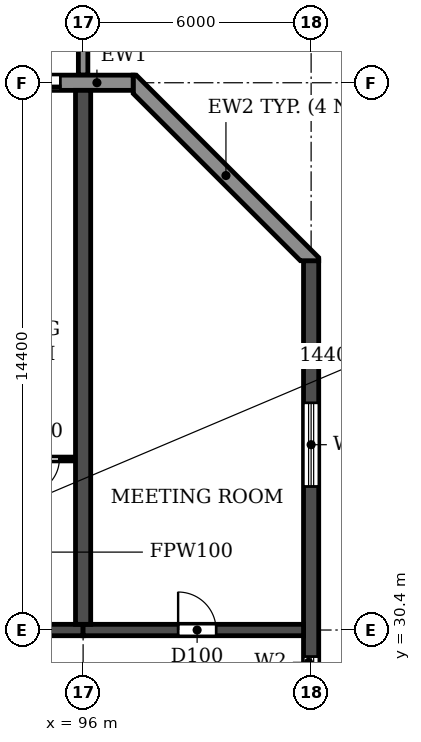
"""IFC4 building model, lengths in metres.
Left out: names, types, materials, properties, quantities, classifications, styles, units other than length and angle.
Written with IfcOpenShell. Run it as: python <this file> out.ifc"""

import sys

from ifc_helpers import new_model, si_unit, direction, frame, frame_2d, origin, place, context, subcontext, project, spatial, polyline, rectangle, outline, extrude, source, transform, mapped, element, fill, save


model = new_model("IFC4")
c1 = context("Model", 3, precision=1e-05, world=origin(), true_north=direction((0.0, 1.0)))
c2 = subcontext(c1, "Body", "Model", "MODEL_VIEW")
j1 = project(units=[si_unit("LENGTHUNIT", "METRE"), si_unit("PLANEANGLEUNIT", "RADIAN")], contexts=[c1])
p1 = place(None, origin())
s1 = spatial("IfcSite", under=j1, at=p1, CompositionType="ELEMENT")
p2 = place(p1, origin())
s2 = spatial("IfcBuilding", under=s1, at=p2, CompositionType="ELEMENT")
p3 = place(p2, frame((0.0, 0.0, 49.8)))
s3 = spatial("IfcBuildingStorey", under=s2, at=p3, CompositionType="ELEMENT", Elevation=49.8)
p4 = place(p3, frame((96.0, 30.55, 0.0), z_axis=(0.0, 0.0, 1.0), x_axis=(0.0, 1.0, 0.0)))
e1 = element("IfcWall", 1, at=p4, inside=s3, PredefinedType="SHEAR", context=c2, shape_type="SweptSolid", body=[
    extrude(rectangle(XDim=14.05, YDim=0.4, at=frame_2d((7.025, 0.0))), origin(), (0.0, 0.0, 1.0), 3.0),
])
p5 = place(p3, frame((102.0, 4.683, 0.0), z_axis=(0.0, 0.0, 1.0), x_axis=(0.0, 1.0, 0.0)))
e2 = element("IfcWall", 2, at=p5, inside=s3, PredefinedType="SHEAR", context=c2, shape_type="SweptSolid", body=[
    extrude(rectangle(XDim=35.434, YDim=0.4, at=frame_2d((17.717, 0.0))), origin(), (0.0, 0.0, 1.0), 3.0),
])
p6 = place(p5, frame((15.917, 0.0, 0.9)))
e3 = element("IfcOpeningElement", 3, at=p6, cuts=e2, PredefinedType="OPENING", context=c2, shape_type="SweptSolid", body=[
    extrude(rectangle(XDim=1.2, YDim=1.5, at=frame_2d((0.6, 0.75))), frame((0.0, 0.21, 0.0), z_axis=(0.0, -1.0, 0.0), x_axis=(1.0, 0.0, 0.0)), (0.0, 0.0, 1.0), 0.42),
])
p7 = place(p5, frame((23.817, 0.0, 0.9)))
e4 = element("IfcOpeningElement", 4, at=p7, cuts=e2, PredefinedType="OPENING", context=c2, shape_type="SweptSolid", body=[
    extrude(rectangle(XDim=1.2, YDim=1.5, at=frame_2d((0.6, 0.75))), frame((0.0, 0.21, 0.0), z_axis=(0.0, -1.0, 0.0), x_axis=(1.0, 0.0, 0.0)), (0.0, 0.0, 1.0), 0.42),
])
p8 = place(p5, frame((8.017, 0.0, 0.9)))
e5 = element("IfcOpeningElement", 5, at=p8, cuts=e2, PredefinedType="OPENING", context=c2, shape_type="SweptSolid", body=[
    extrude(rectangle(XDim=1.2, YDim=1.5, at=frame_2d((0.6, 0.75))), frame((0.0, 0.21, 0.0), z_axis=(0.0, -1.0, 0.0), x_axis=(1.0, 0.0, 0.0)), (0.0, 0.0, 1.0), 0.42),
])
p9 = place(p5, frame((29.493, 0.0, 0.6)))
e6 = element("IfcOpeningElement", 6, at=p9, cuts=e2, PredefinedType="OPENING", context=c2, shape_type="SweptSolid", body=[
    extrude(rectangle(XDim=2.2, YDim=1.8, at=frame_2d((1.1, 0.9))), frame((0.0, 0.21, 0.0), z_axis=(0.0, -1.0, 0.0), x_axis=(1.0, 0.0, 0.0)), (0.0, 0.0, 1.0), 0.42),
])
p10 = place(p5, frame((2.541, 0.0, 0.6)))
e7 = element("IfcOpeningElement", 7, at=p10, cuts=e2, PredefinedType="OPENING", context=c2, shape_type="SweptSolid", body=[
    extrude(rectangle(XDim=2.2, YDim=1.8, at=frame_2d((1.1, 0.9))), frame((0.0, 0.21, 0.0), z_axis=(0.0, -1.0, 0.0), x_axis=(1.0, 0.0, 0.0)), (0.0, 0.0, 1.0), 0.42),
])
p11 = place(p3, frame((90.0, 30.4, 0.0), z_axis=(0.0, 0.0, 1.0), x_axis=(1.0, 0.0, 0.0)))
e8 = element("IfcWall", 8, at=p11, inside=s3, PredefinedType="SHEAR", context=c2, shape_type="SweptSolid", body=[
    extrude(rectangle(XDim=6.0, YDim=0.3, at=frame_2d((3.0, 0.0))), origin(), (0.0, 0.0, 1.0), 2.4),
])
p12 = place(p11, frame((2.45, 0.0, 0.0)))
e9 = element("IfcOpeningElement", 9, at=p12, cuts=e8, PredefinedType="OPENING", context=c2, shape_type="SweptSolid", body=[
    extrude(rectangle(XDim=1.0, YDim=2.1, at=frame_2d((0.5, 1.05))), frame((0.0, 0.16, 0.0), z_axis=(0.0, -1.0, 0.0), x_axis=(1.0, 0.0, 0.0)), (0.0, 0.0, 1.0), 0.32),
])
p13 = place(p3, frame((96.0, 30.4, 0.0), z_axis=(0.0, 0.0, 1.0), x_axis=(1.0, 0.0, 0.0)))
e10 = element("IfcWall", 10, at=p13, inside=s3, PredefinedType="SHEAR", context=c2, shape_type="SweptSolid", body=[
    extrude(rectangle(XDim=5.8, YDim=0.3, at=frame_2d((2.9, 0.0))), origin(), (0.0, 0.0, 1.0), 2.4),
])
p14 = place(p13, frame((2.5, 0.0, 0.0)))
e11 = element("IfcOpeningElement", 11, at=p14, cuts=e10, PredefinedType="OPENING", context=c2, shape_type="SweptSolid", body=[
    extrude(rectangle(XDim=1.0, YDim=2.1, at=frame_2d((0.5, 1.05))), frame((0.0, 0.16, 0.0), z_axis=(0.0, -1.0, 0.0), x_axis=(1.0, 0.0, 0.0)), (0.0, 0.0, 1.0), 0.32),
])
p15 = place(p3, origin())
e12 = element("IfcWall", 12, at=p15, inside=s3, PredefinedType="STANDARD", context=c2, shape_type="SweptSolid", body=[
    extrude(outline(polyline([(102.2, 40.117), (102.2, 40.2), (97.4, 45.0), (97.317, 45.0), (97.317, 44.517), (101.717, 40.117), (102.2, 40.117)])), origin(), (0.0, 0.0, 1.0), 3.0),
])
p16 = place(p3, frame((97.317, 44.8, 0.0), z_axis=(0.0, 0.0, 1.0), x_axis=(-1.0, 0.0, 0.0)))
e13 = element("IfcWall", 13, at=p16, inside=s3, PredefinedType="STANDARD", context=c2, shape_type="SweptSolid", body=[
    extrude(rectangle(XDim=92.634, YDim=0.4, at=frame_2d((46.317, 0.0))), origin(), (0.0, 0.0, 1.0), 3.0),
])
p17 = place(p16, frame((88.917, 0.0, 0.0)))
e14 = element("IfcOpeningElement", 14, at=p17, cuts=e13, PredefinedType="OPENING", context=c2, shape_type="SweptSolid", body=[
    extrude(rectangle(XDim=1.8, YDim=2.4, at=frame_2d((0.9, 1.2))), frame((0.0, 0.21, 0.0), z_axis=(0.0, -1.0, 0.0), x_axis=(1.0, 0.0, 0.0)), (0.0, 0.0, 1.0), 0.42),
])
p18 = place(p16, frame((85.717, 0.0, 0.9)))
e15 = element("IfcOpeningElement", 15, at=p18, cuts=e13, PredefinedType="OPENING", context=c2, shape_type="SweptSolid", body=[
    extrude(rectangle(XDim=2.2, YDim=1.5, at=frame_2d((1.1, 0.75))), frame((0.0, 0.21, 0.0), z_axis=(0.0, -1.0, 0.0), x_axis=(1.0, 0.0, 0.0)), (0.0, 0.0, 1.0), 0.42),
])
p19 = place(p16, frame((82.717, 0.0, 0.9)))
e16 = element("IfcOpeningElement", 16, at=p19, cuts=e13, PredefinedType="OPENING", context=c2, shape_type="SweptSolid", body=[
    extrude(rectangle(XDim=2.2, YDim=1.5, at=frame_2d((1.1, 0.75))), frame((0.0, 0.21, 0.0), z_axis=(0.0, -1.0, 0.0), x_axis=(1.0, 0.0, 0.0)), (0.0, 0.0, 1.0), 0.42),
])
p20 = place(p16, frame((79.717, 0.0, 0.9)))
e17 = element("IfcOpeningElement", 17, at=p20, cuts=e13, PredefinedType="OPENING", context=c2, shape_type="SweptSolid", body=[
    extrude(rectangle(XDim=2.2, YDim=1.5, at=frame_2d((1.1, 0.75))), frame((0.0, 0.21, 0.0), z_axis=(0.0, -1.0, 0.0), x_axis=(1.0, 0.0, 0.0)), (0.0, 0.0, 1.0), 0.42),
])
p21 = place(p16, frame((76.717, 0.0, 0.9)))
e18 = element("IfcOpeningElement", 18, at=p21, cuts=e13, PredefinedType="OPENING", context=c2, shape_type="SweptSolid", body=[
    extrude(rectangle(XDim=2.2, YDim=1.5, at=frame_2d((1.1, 0.75))), frame((0.0, 0.21, 0.0), z_axis=(0.0, -1.0, 0.0), x_axis=(1.0, 0.0, 0.0)), (0.0, 0.0, 1.0), 0.42),
])
p22 = place(p16, frame((73.917, 0.0, 0.0)))
e19 = element("IfcOpeningElement", 19, at=p22, cuts=e13, PredefinedType="OPENING", context=c2, shape_type="SweptSolid", body=[
    extrude(rectangle(XDim=1.8, YDim=2.4, at=frame_2d((0.9, 1.2))), frame((0.0, 0.21, 0.0), z_axis=(0.0, -1.0, 0.0), x_axis=(1.0, 0.0, 0.0)), (0.0, 0.0, 1.0), 0.42),
])
p23 = place(p16, frame((70.717, 0.0, 0.9)))
e20 = element("IfcOpeningElement", 20, at=p23, cuts=e13, PredefinedType="OPENING", context=c2, shape_type="SweptSolid", body=[
    extrude(rectangle(XDim=2.2, YDim=1.5, at=frame_2d((1.1, 0.75))), frame((0.0, 0.21, 0.0), z_axis=(0.0, -1.0, 0.0), x_axis=(1.0, 0.0, 0.0)), (0.0, 0.0, 1.0), 0.42),
])
p24 = place(p16, frame((67.717, 0.0, 0.9)))
e21 = element("IfcOpeningElement", 21, at=p24, cuts=e13, PredefinedType="OPENING", context=c2, shape_type="SweptSolid", body=[
    extrude(rectangle(XDim=2.2, YDim=1.5, at=frame_2d((1.1, 0.75))), frame((0.0, 0.21, 0.0), z_axis=(0.0, -1.0, 0.0), x_axis=(1.0, 0.0, 0.0)), (0.0, 0.0, 1.0), 0.42),
])
p25 = place(p16, frame((64.717, 0.0, 0.9)))
e22 = element("IfcOpeningElement", 22, at=p25, cuts=e13, PredefinedType="OPENING", context=c2, shape_type="SweptSolid", body=[
    extrude(rectangle(XDim=2.2, YDim=1.5, at=frame_2d((1.1, 0.75))), frame((0.0, 0.21, 0.0), z_axis=(0.0, -1.0, 0.0), x_axis=(1.0, 0.0, 0.0)), (0.0, 0.0, 1.0), 0.42),
])
p26 = place(p16, frame((61.917, 0.0, 0.0)))
e23 = element("IfcOpeningElement", 23, at=p26, cuts=e13, PredefinedType="OPENING", context=c2, shape_type="SweptSolid", body=[
    extrude(rectangle(XDim=1.8, YDim=2.4, at=frame_2d((0.9, 1.2))), frame((0.0, 0.21, 0.0), z_axis=(0.0, -1.0, 0.0), x_axis=(1.0, 0.0, 0.0)), (0.0, 0.0, 1.0), 0.42),
])
p27 = place(p16, frame((58.717, 0.0, 0.9)))
e24 = element("IfcOpeningElement", 24, at=p27, cuts=e13, PredefinedType="OPENING", context=c2, shape_type="SweptSolid", body=[
    extrude(rectangle(XDim=2.2, YDim=1.5, at=frame_2d((1.1, 0.75))), frame((0.0, 0.21, 0.0), z_axis=(0.0, -1.0, 0.0), x_axis=(1.0, 0.0, 0.0)), (0.0, 0.0, 1.0), 0.42),
])
p28 = place(p16, frame((55.717, 0.0, 0.9)))
e25 = element("IfcOpeningElement", 25, at=p28, cuts=e13, PredefinedType="OPENING", context=c2, shape_type="SweptSolid", body=[
    extrude(rectangle(XDim=2.2, YDim=1.5, at=frame_2d((1.1, 0.75))), frame((0.0, 0.21, 0.0), z_axis=(0.0, -1.0, 0.0), x_axis=(1.0, 0.0, 0.0)), (0.0, 0.0, 1.0), 0.42),
])
p29 = place(p16, frame((52.717, 0.0, 0.9)))
e26 = element("IfcOpeningElement", 26, at=p29, cuts=e13, PredefinedType="OPENING", context=c2, shape_type="SweptSolid", body=[
    extrude(rectangle(XDim=2.2, YDim=1.5, at=frame_2d((1.1, 0.75))), frame((0.0, 0.21, 0.0), z_axis=(0.0, -1.0, 0.0), x_axis=(1.0, 0.0, 0.0)), (0.0, 0.0, 1.0), 0.42),
])
p30 = place(p16, frame((49.917, 0.0, 0.0)))
e27 = element("IfcOpeningElement", 27, at=p30, cuts=e13, PredefinedType="OPENING", context=c2, shape_type="SweptSolid", body=[
    extrude(rectangle(XDim=1.8, YDim=2.4, at=frame_2d((0.9, 1.2))), frame((0.0, 0.21, 0.0), z_axis=(0.0, -1.0, 0.0), x_axis=(1.0, 0.0, 0.0)), (0.0, 0.0, 1.0), 0.42),
])
p31 = place(p16, frame((46.717, 0.0, 0.9)))
e28 = element("IfcOpeningElement", 28, at=p31, cuts=e13, PredefinedType="OPENING", context=c2, shape_type="SweptSolid", body=[
    extrude(rectangle(XDim=2.2, YDim=1.5, at=frame_2d((1.1, 0.75))), frame((0.0, 0.21, 0.0), z_axis=(0.0, -1.0, 0.0), x_axis=(1.0, 0.0, 0.0)), (0.0, 0.0, 1.0), 0.42),
])
p32 = place(p16, frame((43.717, 0.0, 0.9)))
e29 = element("IfcOpeningElement", 29, at=p32, cuts=e13, PredefinedType="OPENING", context=c2, shape_type="SweptSolid", body=[
    extrude(rectangle(XDim=2.2, YDim=1.5, at=frame_2d((1.1, 0.75))), frame((0.0, 0.21, 0.0), z_axis=(0.0, -1.0, 0.0), x_axis=(1.0, 0.0, 0.0)), (0.0, 0.0, 1.0), 0.42),
])
p33 = place(p16, frame((40.717, 0.0, 0.9)))
e30 = element("IfcOpeningElement", 30, at=p33, cuts=e13, PredefinedType="OPENING", context=c2, shape_type="SweptSolid", body=[
    extrude(rectangle(XDim=2.2, YDim=1.5, at=frame_2d((1.1, 0.75))), frame((0.0, 0.21, 0.0), z_axis=(0.0, -1.0, 0.0), x_axis=(1.0, 0.0, 0.0)), (0.0, 0.0, 1.0), 0.42),
])
p34 = place(p16, frame((37.917, 0.0, 0.0)))
e31 = element("IfcOpeningElement", 31, at=p34, cuts=e13, PredefinedType="OPENING", context=c2, shape_type="SweptSolid", body=[
    extrude(rectangle(XDim=1.8, YDim=2.4, at=frame_2d((0.9, 1.2))), frame((0.0, 0.21, 0.0), z_axis=(0.0, -1.0, 0.0), x_axis=(1.0, 0.0, 0.0)), (0.0, 0.0, 1.0), 0.42),
])
p35 = place(p16, frame((34.717, 0.0, 0.9)))
e32 = element("IfcOpeningElement", 32, at=p35, cuts=e13, PredefinedType="OPENING", context=c2, shape_type="SweptSolid", body=[
    extrude(rectangle(XDim=2.2, YDim=1.5, at=frame_2d((1.1, 0.75))), frame((0.0, 0.21, 0.0), z_axis=(0.0, -1.0, 0.0), x_axis=(1.0, 0.0, 0.0)), (0.0, 0.0, 1.0), 0.42),
])
p36 = place(p16, frame((31.717, 0.0, 0.9)))
e33 = element("IfcOpeningElement", 33, at=p36, cuts=e13, PredefinedType="OPENING", context=c2, shape_type="SweptSolid", body=[
    extrude(rectangle(XDim=2.2, YDim=1.5, at=frame_2d((1.1, 0.75))), frame((0.0, 0.21, 0.0), z_axis=(0.0, -1.0, 0.0), x_axis=(1.0, 0.0, 0.0)), (0.0, 0.0, 1.0), 0.42),
])
p37 = place(p16, frame((28.717, 0.0, 0.9)))
e34 = element("IfcOpeningElement", 34, at=p37, cuts=e13, PredefinedType="OPENING", context=c2, shape_type="SweptSolid", body=[
    extrude(rectangle(XDim=2.2, YDim=1.5, at=frame_2d((1.1, 0.75))), frame((0.0, 0.21, 0.0), z_axis=(0.0, -1.0, 0.0), x_axis=(1.0, 0.0, 0.0)), (0.0, 0.0, 1.0), 0.42),
])
p38 = place(p16, frame((25.917, 0.0, 0.0)))
e35 = element("IfcOpeningElement", 35, at=p38, cuts=e13, PredefinedType="OPENING", context=c2, shape_type="SweptSolid", body=[
    extrude(rectangle(XDim=1.8, YDim=2.4, at=frame_2d((0.9, 1.2))), frame((0.0, 0.21, 0.0), z_axis=(0.0, -1.0, 0.0), x_axis=(1.0, 0.0, 0.0)), (0.0, 0.0, 1.0), 0.42),
])
p39 = place(p16, frame((22.917, 0.0, 0.0)))
e36 = element("IfcOpeningElement", 36, at=p39, cuts=e13, PredefinedType="OPENING", context=c2, shape_type="SweptSolid", body=[
    extrude(rectangle(XDim=1.8, YDim=2.4, at=frame_2d((0.9, 1.2))), frame((0.0, 0.21, 0.0), z_axis=(0.0, -1.0, 0.0), x_axis=(1.0, 0.0, 0.0)), (0.0, 0.0, 1.0), 0.42),
])
p40 = place(p16, frame((19.717, 0.0, 0.9)))
e37 = element("IfcOpeningElement", 37, at=p40, cuts=e13, PredefinedType="OPENING", context=c2, shape_type="SweptSolid", body=[
    extrude(rectangle(XDim=2.2, YDim=1.5, at=frame_2d((1.1, 0.75))), frame((0.0, 0.21, 0.0), z_axis=(0.0, -1.0, 0.0), x_axis=(1.0, 0.0, 0.0)), (0.0, 0.0, 1.0), 0.42),
])
p41 = place(p16, frame((16.717, 0.0, 0.9)))
e38 = element("IfcOpeningElement", 38, at=p41, cuts=e13, PredefinedType="OPENING", context=c2, shape_type="SweptSolid", body=[
    extrude(rectangle(XDim=2.2, YDim=1.5, at=frame_2d((1.1, 0.75))), frame((0.0, 0.21, 0.0), z_axis=(0.0, -1.0, 0.0), x_axis=(1.0, 0.0, 0.0)), (0.0, 0.0, 1.0), 0.42),
])
p42 = place(p16, frame((13.717, 0.0, 0.9)))
e39 = element("IfcOpeningElement", 39, at=p42, cuts=e13, PredefinedType="OPENING", context=c2, shape_type="SweptSolid", body=[
    extrude(rectangle(XDim=2.2, YDim=1.5, at=frame_2d((1.1, 0.75))), frame((0.0, 0.21, 0.0), z_axis=(0.0, -1.0, 0.0), x_axis=(1.0, 0.0, 0.0)), (0.0, 0.0, 1.0), 0.42),
])
p43 = place(p16, frame((10.717, 0.0, 0.9)))
e40 = element("IfcOpeningElement", 40, at=p43, cuts=e13, PredefinedType="OPENING", context=c2, shape_type="SweptSolid", body=[
    extrude(rectangle(XDim=2.2, YDim=1.5, at=frame_2d((1.1, 0.75))), frame((0.0, 0.21, 0.0), z_axis=(0.0, -1.0, 0.0), x_axis=(1.0, 0.0, 0.0)), (0.0, 0.0, 1.0), 0.42),
])
p44 = place(p16, frame((7.917, 0.0, 0.0)))
e41 = element("IfcOpeningElement", 41, at=p44, cuts=e13, PredefinedType="OPENING", context=c2, shape_type="SweptSolid", body=[
    extrude(rectangle(XDim=1.8, YDim=2.4, at=frame_2d((0.9, 1.2))), frame((0.0, 0.21, 0.0), z_axis=(0.0, -1.0, 0.0), x_axis=(1.0, 0.0, 0.0)), (0.0, 0.0, 1.0), 0.42),
])
p45 = place(p16, frame((4.717, 0.0, 0.9)))
e42 = element("IfcOpeningElement", 42, at=p45, cuts=e13, PredefinedType="OPENING", context=c2, shape_type="SweptSolid", body=[
    extrude(rectangle(XDim=2.2, YDim=1.5, at=frame_2d((1.1, 0.75))), frame((0.0, 0.21, 0.0), z_axis=(0.0, -1.0, 0.0), x_axis=(1.0, 0.0, 0.0)), (0.0, 0.0, 1.0), 0.42),
])
p46 = place(p16, frame((1.917, 0.0, 0.0)))
e43 = element("IfcOpeningElement", 43, at=p46, cuts=e13, PredefinedType="OPENING", context=c2, shape_type="SweptSolid", body=[
    extrude(rectangle(XDim=1.8, YDim=2.4, at=frame_2d((0.9, 1.2))), frame((0.0, 0.21, 0.0), z_axis=(0.0, -1.0, 0.0), x_axis=(1.0, 0.0, 0.0)), (0.0, 0.0, 1.0), 0.42),
])
m1 = source(origin(), c2, "Body", "SweptSolid", [
    extrude(outline(polyline([(0.0, 0.0), (0.25, 0.0), (0.25, 3.1), (0.0, 3.1), (0.0, 0.0)])), origin(), (0.0, 0.0, 1.0), 3.1),
])
p47 = place(p3, frame((95.875, 45.0, 0.0)))
e44 = element("IfcWall", 44, at=p47, inside=s3, PredefinedType="STANDARD", context=c2, shape_type="MappedRepresentation", body=[
    mapped(m1, transform((0.0, 0.0, 0.0))),
])
p48 = place(p3, frame((93.8, 34.9, 0.0), z_axis=(0.0, 0.0, 1.0), x_axis=(1.0, 0.0, 0.0)))
e45 = element("IfcWall", 45, at=p48, inside=s3, PredefinedType="PARTITIONING", context=c2, shape_type="SweptSolid", body=[
    extrude(rectangle(XDim=1.99, YDim=0.1, at=frame_2d((0.995, 0.0))), origin(), (0.0, 0.0, 1.0), 3.0),
])
p49 = place(p48, frame((0.675, 0.0, 0.0)))
e46 = element("IfcOpeningElement", 46, at=p49, cuts=e45, PredefinedType="OPENING", context=c2, shape_type="SweptSolid", body=[
    extrude(rectangle(XDim=0.9, YDim=2.1, at=frame_2d((0.45, 1.05))), frame((0.0, 0.06, 0.0), z_axis=(0.0, -1.0, 0.0), x_axis=(1.0, 0.0, 0.0)), (0.0, 0.0, 1.0), 0.12),
])
p50 = place(p7, origin())
e47 = element("IfcWindow", 47, at=p50, inside=s3, PartitioningType="SINGLE_PANEL", PredefinedType="WINDOW", context=c2, shape_type="SweptSolid", body=[
    extrude(rectangle(XDim=1.2, YDim=1.5, at=frame_2d((0.6, 0.75))), frame((0.0, 0.03, 0.0), z_axis=(0.0, -1.0, 0.0), x_axis=(1.0, 0.0, 0.0)), (0.0, 0.0, 1.0), 0.06),
])
fill(e4, e47)
p51 = place(p9, origin())
e48 = element("IfcWindow", 48, at=p51, inside=s3, PartitioningType="DOUBLE_PANEL_HORIZONTAL", PredefinedType="WINDOW", context=c2, shape_type="SweptSolid", body=[
    extrude(rectangle(XDim=2.2, YDim=1.8, at=frame_2d((1.1, 0.9))), frame((0.0, 0.03, 0.0), z_axis=(0.0, -1.0, 0.0), x_axis=(1.0, 0.0, 0.0)), (0.0, 0.0, 1.0), 0.06),
])
fill(e6, e48)
p52 = place(p46, origin())
e49 = element("IfcDoor", 49, at=p52, inside=s3, OperationType="DOUBLE_DOOR_SLIDING", PredefinedType="DOOR", context=c2, shape_type="SweptSolid", body=[
    extrude(rectangle(XDim=1.8, YDim=2.4, at=frame_2d((0.9, 1.2))), frame((0.0, 0.025, 0.0), z_axis=(0.0, -1.0, 0.0), x_axis=(1.0, 0.0, 0.0)), (0.0, 0.0, 1.0), 0.05),
])
fill(e43, e49)
p53 = place(p49, frame((0.9, 0.0, 0.0), z_axis=(0.0, 0.0, 1.0), x_axis=(-1.0, 0.0, 0.0)))
e50 = element("IfcDoor", 50, at=p53, inside=s3, OperationType="SINGLE_SWING_RIGHT", PredefinedType="DOOR", context=c2, shape_type="SweptSolid", body=[
    extrude(rectangle(XDim=0.9, YDim=2.1, at=frame_2d((0.45, 1.05))), frame((0.0, 0.025, 0.0), z_axis=(0.0, -1.0, 0.0), x_axis=(1.0, 0.0, 0.0)), (0.0, 0.0, 1.0), 0.05),
])
fill(e46, e50)
p54 = place(p14, origin())
e51 = element("IfcDoor", 51, at=p54, inside=s3, OperationType="SINGLE_SWING_LEFT", PredefinedType="DOOR", context=c2, shape_type="SweptSolid", body=[
    extrude(rectangle(XDim=1.0, YDim=2.1, at=frame_2d((0.5, 1.05))), frame((0.0, 0.025, 0.0), z_axis=(0.0, -1.0, 0.0), x_axis=(1.0, 0.0, 0.0)), (0.0, 0.0, 1.0), 0.05),
])
fill(e11, e51)
save(model, sys.argv[1])
